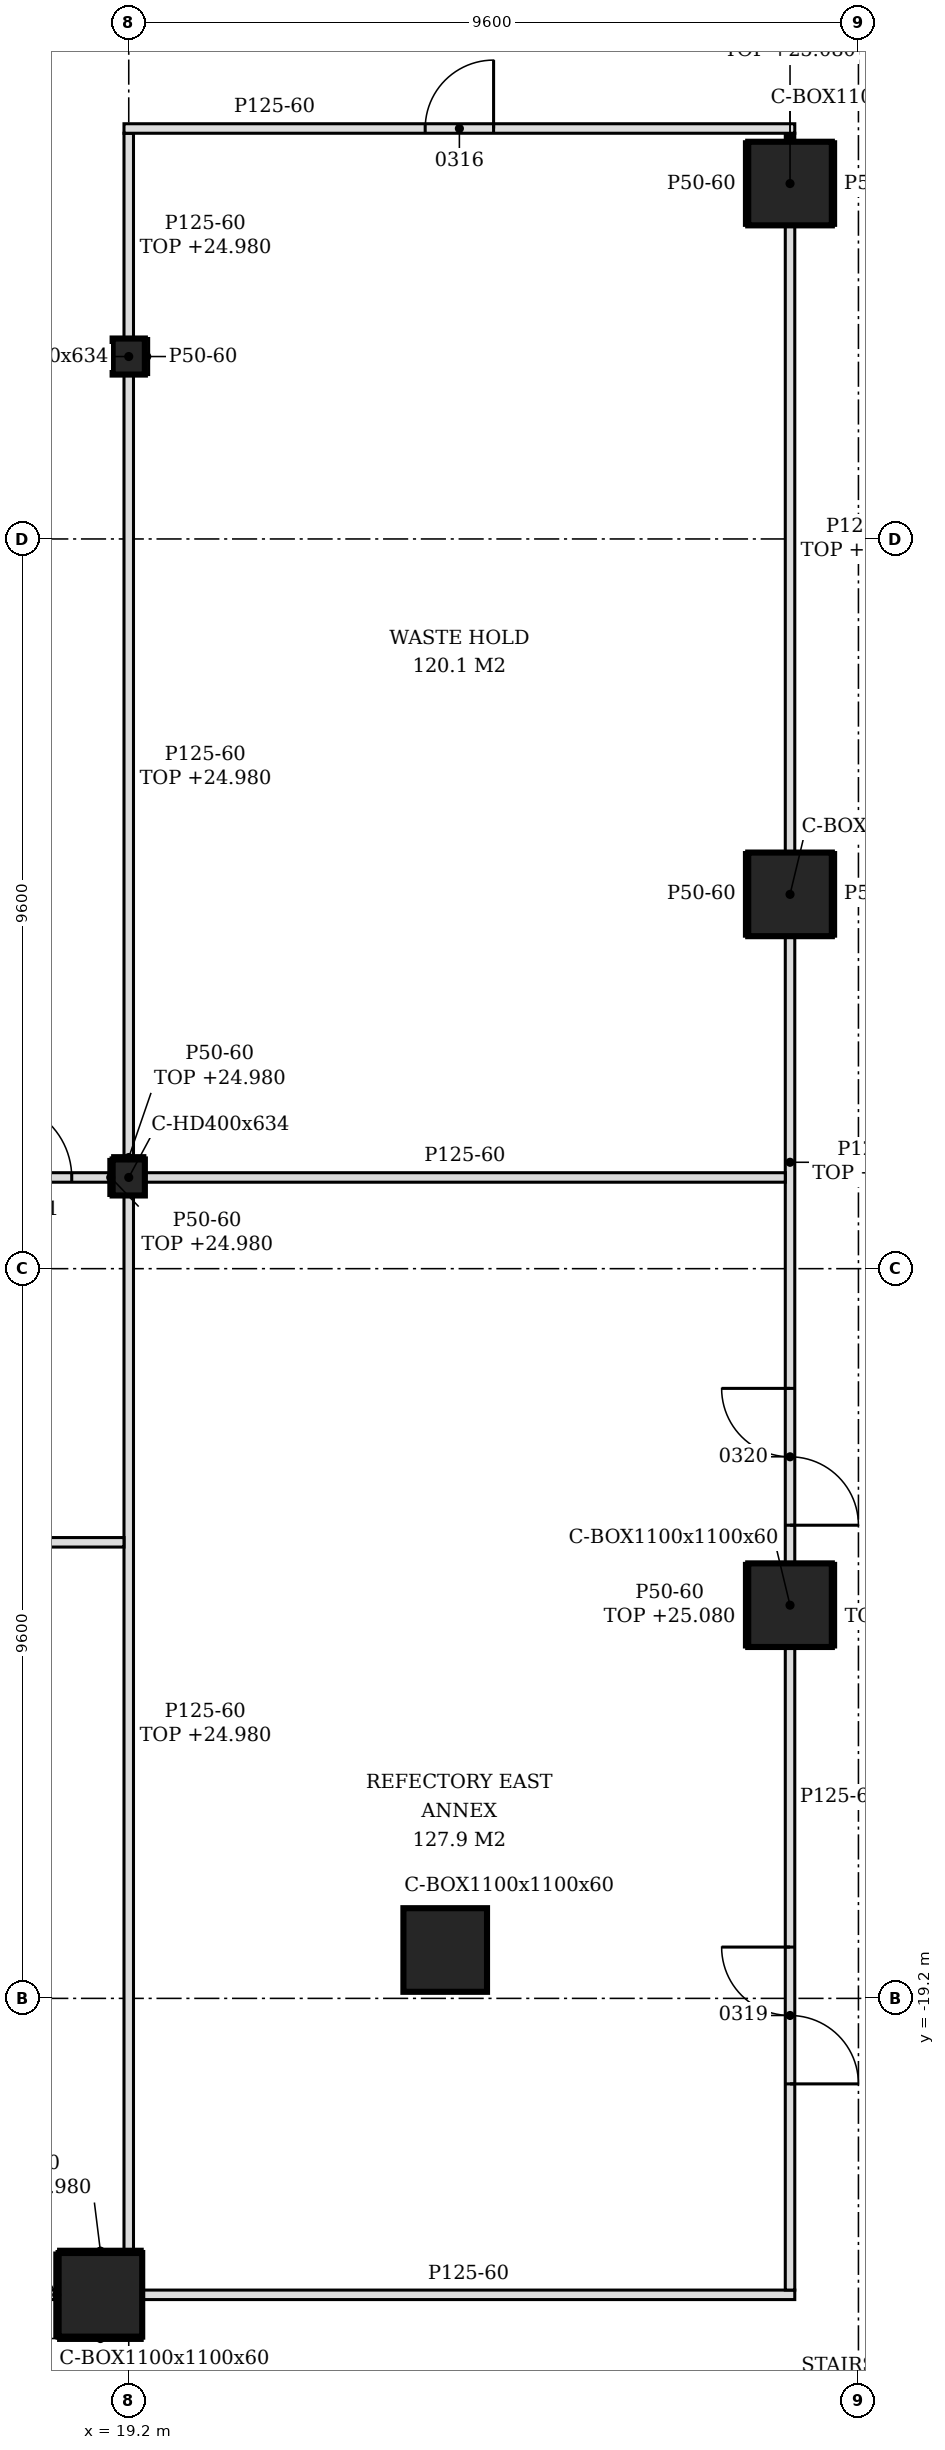
"""IFC4 building model, lengths in metres.
Left out: names, types, materials, properties, quantities, classifications, styles, units other than length and angle.
Written with IfcOpenShell. Run it as: python <this file> out.ifc"""

import sys

from ifc_helpers import new_model, si_unit, direction, frame, frame_2d, origin, origin_2d, place, context, subcontext, project, spatial, polyline, rectangle, hollow_rectangle, i_section, outline, extrude, element, fill, save


model = new_model("IFC4")
c1 = context("Model", 3, precision=1e-05, world=origin(), true_north=direction((0.0, 1.0)))
c2 = subcontext(c1, "Body", "Model", "MODEL_VIEW")
j1 = project(units=[si_unit("LENGTHUNIT", "METRE"), si_unit("PLANEANGLEUNIT", "RADIAN")], contexts=[c1])
p1 = place(None, origin())
s1 = spatial("IfcSite", under=j1, at=p1, CompositionType="ELEMENT")
p2 = place(p1, origin())
s2 = spatial("IfcBuilding", under=s1, at=p2, CompositionType="ELEMENT")
p3 = place(p2, frame((0.0, 0.0, 21.0)))
s3 = spatial("IfcBuildingStorey", under=s2, at=p3, CompositionType="ELEMENT", Elevation=21.0)
for number, where, z_axis, x_axis in (
    (1, (18.827, -23.1, -0.2), (0.0, 0.0, 1.0), (1.0, 0.0, 0.0)),
    (2, (23.364, -18.564, -0.2), (0.0, 0.0, 1.0), (1.0, 0.0, 0.0)),
    (3, (27.9, -14.027, -0.2), (0.0, 0.0, 1.0), (1.0, 0.0, 0.0)),
    (4, (27.9, -4.676, -0.2), (0.0, 0.0, 1.0), (1.0, 0.0, 0.0)),
    (5, (27.9, 4.676, -0.2), (0.0, 0.0, 1.0), (1.0, 0.0, 0.0)),
):
    element("IfcColumn", number, at=place(p3, frame(where, z_axis=z_axis, x_axis=x_axis)), inside=s3, PredefinedType="COLUMN", context=c2, shape_type="SweptSolid", body=[
        extrude(hollow_rectangle(XDim=1.1, YDim=1.1, WallThickness=0.06, at=origin_2d()), origin(), (0.0, 0.0, 1.0), 4.8),
    ])
for number, where, z_axis, x_axis in (
    (6, (19.2, -8.4, -0.2), (0.0, 0.0, 1.0), (1.0, 0.0, 0.0)),
    (7, (19.2, 2.4, -0.2), (0.0, 0.0, 1.0), (1.0, 0.0, 0.0)),
):
    element("IfcColumn", number, at=place(p3, frame(where, z_axis=z_axis, x_axis=x_axis)), inside=s3, PredefinedType="COLUMN", context=c2, shape_type="SweptSolid", body=[
        extrude(i_section(OverallWidth=0.424, OverallDepth=0.474, WebThickness=0.048, FlangeThickness=0.077, FilletRadius=0.015, at=origin_2d()), origin(), (0.0, 0.0, 1.0), 4.8),
    ])
p4 = place(p3, frame((9.964, -23.1, 0.0), z_axis=(0.0, 0.0, 1.0), x_axis=(1.0, 0.0, 0.0)))
e8 = element("IfcWall", 8, at=p4, inside=s3, PredefinedType="PARTITIONING", context=c2, shape_type="SweptSolid", body=[
    extrude(rectangle(XDim=8.313, YDim=0.125, at=frame_2d((4.157, 0.0))), origin(), (0.0, 0.0, 1.0), 4.08),
])
p5 = place(p4, frame((3.986, 0.0, 0.0)))
e9 = element("IfcOpeningElement", 9, at=p5, cuts=e8, PredefinedType="OPENING", context=c2, shape_type="SweptSolid", body=[
    extrude(rectangle(XDim=0.9, YDim=2.1, at=frame_2d((0.45, 1.05))), frame((0.0, 0.073, 0.0), z_axis=(0.0, -1.0, 0.0), x_axis=(1.0, 0.0, 0.0)), (0.0, 0.0, 1.0), 0.145),
])
p6 = place(p3, frame((19.377, -23.1, 0.0), z_axis=(0.0, 0.0, 1.0), x_axis=(1.0, 0.0, 0.0)))
e10 = element("IfcWall", 10, at=p6, inside=s3, PredefinedType="PARTITIONING", context=c2, shape_type="SweptSolid", body=[
    extrude(rectangle(XDim=8.585, YDim=0.125, at=frame_2d((4.292, 0.0))), origin(), (0.0, 0.0, 1.0), 4.6),
])
p7 = place(p3, frame((27.9, -23.038, 0.0), z_axis=(0.0, 0.0, 1.0), x_axis=(0.0, 1.0, 0.0)))
e11 = element("IfcWall", 11, at=p7, inside=s3, PredefinedType="PARTITIONING", context=c2, shape_type="SweptSolid", body=[
    extrude(outline(polyline([(0.0, 0.0), (8.46, 0.0), (8.46, 4.6), (3.927, 4.6), (3.926, 4.18), (3.748, 4.18), (3.746, 4.6), (0.0, 4.6), (0.0, 0.0)])), frame((0.0, 0.062, 0.0), z_axis=(0.0, -1.0, 0.0), x_axis=(1.0, 0.0, 0.0)), (0.0, 0.0, 1.0), 0.125),
])
p8 = place(p7, frame((2.712, 0.0, 0.0)))
e12 = element("IfcOpeningElement", 12, at=p8, cuts=e11, PredefinedType="OPENING", context=c2, shape_type="SweptSolid", body=[
    extrude(rectangle(XDim=1.8, YDim=2.1, at=frame_2d((0.9, 1.05))), frame((0.0, 0.073, 0.0), z_axis=(0.0, -1.0, 0.0), x_axis=(1.0, 0.0, 0.0)), (0.0, 0.0, 1.0), 0.145),
])
p9 = place(p3, frame((19.2, -22.55, 0.0), z_axis=(0.0, 0.0, 1.0), x_axis=(0.0, 1.0, 0.0)))
e13 = element("IfcWall", 13, at=p9, inside=s3, PredefinedType="PARTITIONING", context=c2, shape_type="SweptSolid", body=[
    extrude(rectangle(XDim=13.913, YDim=0.125, at=frame_2d((6.957, 0.0))), origin(), (0.0, 0.0, 1.0), 3.98),
])
p10 = place(p3, frame((27.9, -13.477, 0.0), z_axis=(0.0, 0.0, 1.0), x_axis=(0.0, 1.0, 0.0)))
e14 = element("IfcWall", 14, at=p10, inside=s3, PredefinedType="PARTITIONING", context=c2, shape_type="SweptSolid", body=[
    extrude(rectangle(XDim=8.252, YDim=0.125, at=frame_2d((4.126, 0.0))), origin(), (0.0, 0.0, 1.0), 4.08),
])
p11 = place(p10, frame((0.502, 0.0, 0.0)))
e15 = element("IfcOpeningElement", 15, at=p11, cuts=e14, PredefinedType="OPENING", context=c2, shape_type="SweptSolid", body=[
    extrude(rectangle(XDim=1.8, YDim=2.1, at=frame_2d((0.9, 1.05))), frame((0.0, 0.073, 0.0), z_axis=(0.0, -1.0, 0.0), x_axis=(1.0, 0.0, 0.0)), (0.0, 0.0, 1.0), 0.145),
])
p12 = place(p3, frame((-4.738, -13.2, 0.0), z_axis=(0.0, 0.0, 1.0), x_axis=(1.0, 0.0, 0.0)))
e16 = element("IfcWall", 16, at=p12, inside=s3, PredefinedType="PARTITIONING", context=c2, shape_type="SweptSolid", body=[
    extrude(outline(polyline([(0.0, 0.0), (23.875, 0.0), (23.875, 3.98), (23.788, 3.98), (23.785, 4.6), (19.288, 4.6), (19.285, 3.98), (18.988, 3.98), (18.986, 4.6), (14.488, 4.6), (14.486, 3.98), (14.188, 3.98), (14.186, 4.6), (9.688, 4.6), (9.686, 3.98), (9.387, 3.98), (9.385, 4.6), (4.887, 4.6), (4.885, 3.98), (4.587, 3.98), (4.585, 4.6), (0.087, 4.6), (0.085, 3.98), (0.0, 3.98), (0.0, 0.0)])), frame((0.0, 0.062, 0.0), z_axis=(0.0, -1.0, 0.0), x_axis=(1.0, 0.0, 0.0)), (0.0, 0.0, 1.0), 0.125),
])
p13 = place(p3, frame((7.412, -8.4, 0.0), z_axis=(0.0, 0.0, 1.0), x_axis=(1.0, 0.0, 0.0)))
e17 = element("IfcWall", 17, at=p13, inside=s3, PredefinedType="PARTITIONING", context=c2, shape_type="SweptSolid", body=[
    extrude(rectangle(XDim=11.576, YDim=0.125, at=frame_2d((5.788, 0.0))), origin(), (0.0, 0.0, 1.0), 3.98),
])
p14 = place(p13, frame((4.138, 0.0, 0.0)))
e18 = element("IfcOpeningElement", 18, at=p14, cuts=e17, PredefinedType="OPENING", context=c2, shape_type="SweptSolid", body=[
    extrude(rectangle(XDim=0.8, YDim=2.1, at=frame_2d((0.4, 1.05))), frame((0.0, 0.073, 0.0), z_axis=(0.0, -1.0, 0.0), x_axis=(1.0, 0.0, 0.0)), (0.0, 0.0, 1.0), 0.145),
])
p15 = place(p13, frame((10.038, 0.0, 0.0)))
e19 = element("IfcOpeningElement", 19, at=p15, cuts=e17, PredefinedType="OPENING", context=c2, shape_type="SweptSolid", body=[
    extrude(rectangle(XDim=1.0, YDim=2.1, at=frame_2d((0.5, 1.05))), frame((0.0, 0.073, 0.0), z_axis=(0.0, -1.0, 0.0), x_axis=(1.0, 0.0, 0.0)), (0.0, 0.0, 1.0), 0.145),
])
p16 = place(p3, frame((19.412, -8.4, 0.0), z_axis=(0.0, 0.0, 1.0), x_axis=(1.0, 0.0, 0.0)))
e20 = element("IfcWall", 20, at=p16, inside=s3, PredefinedType="PARTITIONING", context=c2, shape_type="SweptSolid", body=[
    extrude(outline(polyline([(0.0, 0.0), (8.425, 0.0), (8.426, 4.08), (8.338, 4.08), (8.336, 4.6), (0.0, 4.6), (0.0, 0.0)])), frame((0.0, 0.062, 0.0), z_axis=(0.0, -1.0, 0.0), x_axis=(1.0, 0.0, 0.0)), (0.0, 0.0, 1.0), 0.125),
])
p17 = place(p3, frame((19.2, -8.163, 0.0), z_axis=(0.0, 0.0, 1.0), x_axis=(0.0, 1.0, 0.0)))
e21 = element("IfcWall", 21, at=p17, inside=s3, PredefinedType="PARTITIONING", context=c2, shape_type="SweptSolid", body=[
    extrude(rectangle(XDim=10.326, YDim=0.125, at=frame_2d((5.163, 0.0))), origin(), (0.0, 0.0, 1.0), 3.98),
])
p18 = place(p3, frame((27.9, -4.126, 0.0), z_axis=(0.0, 0.0, 1.0), x_axis=(0.0, 1.0, 0.0)))
e22 = element("IfcWall", 22, at=p18, inside=s3, PredefinedType="PARTITIONING", context=c2, shape_type="SweptSolid", body=[
    extrude(rectangle(XDim=8.251, YDim=0.125, at=frame_2d((4.126, 0.0))), origin(), (0.0, 0.0, 1.0), 4.08),
])
p19 = place(p3, frame((19.2, 2.637, 0.0), z_axis=(0.0, 0.0, 1.0), x_axis=(0.0, 1.0, 0.0)))
e23 = element("IfcWall", 23, at=p19, inside=s3, PredefinedType="PARTITIONING", context=c2, shape_type="SweptSolid", body=[
    extrude(rectangle(XDim=2.7, YDim=0.125, at=frame_2d((1.35, 0.0))), origin(), (0.0, 0.0, 1.0), 3.98),
])
p20 = place(p3, frame((27.9, 5.226, 0.0), z_axis=(0.0, 0.0, 1.0), x_axis=(0.0, 1.0, 0.0)))
e24 = element("IfcWall", 24, at=p20, inside=s3, PredefinedType="PARTITIONING", context=c2, shape_type="SweptSolid", body=[
    extrude(rectangle(XDim=0.112, YDim=0.125, at=frame_2d((0.056, 0.0))), origin(), (0.0, 0.0, 1.0), 4.08),
])
p21 = place(p3, frame((19.137, 5.4, 0.0), z_axis=(0.0, 0.0, 1.0), x_axis=(1.0, 0.0, 0.0)))
e25 = element("IfcWall", 25, at=p21, inside=s3, PredefinedType="PARTITIONING", context=c2, shape_type="SweptSolid", body=[
    extrude(outline(polyline([(0.0, 0.0), (8.825, 0.0), (8.825, 4.08), (8.613, 4.08), (8.611, 4.6), (4.962, 4.6), (4.96, 4.08), (4.762, 4.08), (4.76, 4.6), (0.212, 4.6), (0.21, 3.98), (0.0, 3.98), (0.0, 0.0)])), frame((0.0, 0.062, 0.0), z_axis=(0.0, -1.0, 0.0), x_axis=(1.0, 0.0, 0.0)), (0.0, 0.0, 1.0), 0.125),
])
p22 = place(p21, frame((3.962, 0.0, 0.0)))
e26 = element("IfcOpeningElement", 26, at=p22, cuts=e25, PredefinedType="OPENING", context=c2, shape_type="SweptSolid", body=[
    extrude(rectangle(XDim=0.9, YDim=2.1, at=frame_2d((0.45, 1.05))), frame((0.0, 0.073, 0.0), z_axis=(0.0, -1.0, 0.0), x_axis=(1.0, 0.0, 0.0)), (0.0, 0.0, 1.0), 0.145),
])
p23 = place(p3, frame((18.277, -22.525, 0.0), z_axis=(0.0, 0.0, 1.0), x_axis=(1.0, 0.0, 0.0)))
e27 = element("IfcWall", 27, at=p23, inside=s3, PredefinedType="PARTITIONING", context=c2, shape_type="SweptSolid", body=[
    extrude(rectangle(XDim=1.1, YDim=0.05, at=frame_2d((0.55, 0.0))), origin(), (0.0, 0.0, 1.0), 3.98),
])
p24 = place(p3, frame((18.277, -23.675, 0.0), z_axis=(0.0, 0.0, 1.0), x_axis=(1.0, 0.0, 0.0)))
e28 = element("IfcWall", 28, at=p24, inside=s3, PredefinedType="PARTITIONING", context=c2, shape_type="SweptSolid", body=[
    extrude(rectangle(XDim=1.1, YDim=0.05, at=frame_2d((0.55, 0.0))), origin(), (0.0, 0.0, 1.0), 4.22),
])
p25 = place(p3, frame((18.252, -23.65, 0.0), z_axis=(0.0, 0.0, 1.0), x_axis=(0.0, 1.0, 0.0)))
e29 = element("IfcWall", 29, at=p25, inside=s3, PredefinedType="PARTITIONING", context=c2, shape_type="SweptSolid", body=[
    extrude(rectangle(XDim=1.1, YDim=0.05, at=frame_2d((0.55, 0.0))), origin(), (0.0, 0.0, 1.0), 4.08),
])
p26 = place(p3, frame((18.963, -8.637, 0.0), z_axis=(0.0, 0.0, 1.0), x_axis=(0.0, 1.0, 0.0)))
e30 = element("IfcWall", 30, at=p26, inside=s3, PredefinedType="PARTITIONING", context=c2, shape_type="SweptSolid", body=[
    extrude(rectangle(XDim=0.474, YDim=0.05, at=frame_2d((0.237, 0.0))), origin(), (0.0, 0.0, 1.0), 3.98),
])
for number, where, z_axis, x_axis in (
    (31, (27.325, -14.577, 0.0), (0.0, 0.0, 1.0), (0.0, 1.0, 0.0)),
    (32, (28.475, -14.577, 0.0), (0.0, 0.0, 1.0), (0.0, 1.0, 0.0)),
):
    element("IfcWall", number, at=place(p3, frame(where, z_axis=z_axis, x_axis=x_axis)), inside=s3, PredefinedType="PARTITIONING", context=c2, shape_type="SweptSolid", body=[
        extrude(rectangle(XDim=1.1, YDim=0.05, at=frame_2d((0.55, 0.0))), origin(), (0.0, 0.0, 1.0), 4.08),
    ])
for number, where, z_axis, x_axis in (
    (33, (27.325, -5.226, 0.0), (0.0, 0.0, 1.0), (0.0, 1.0, 0.0)),
    (34, (28.475, -5.226, 0.0), (0.0, 0.0, 1.0), (0.0, 1.0, 0.0)),
    (35, (27.325, 4.126, 0.0), (0.0, 0.0, 1.0), (0.0, 1.0, 0.0)),
    (36, (28.475, 4.126, 0.0), (0.0, 0.0, 1.0), (0.0, 1.0, 0.0)),
):
    element("IfcWall", number, at=place(p3, frame(where, z_axis=z_axis, x_axis=x_axis)), inside=s3, PredefinedType="PARTITIONING", context=c2, shape_type="SweptSolid", body=[
        extrude(rectangle(XDim=1.1, YDim=0.05, at=frame_2d((0.55, 0.0))), origin(), (0.0, 0.0, 1.0), 4.6),
    ])
p27 = place(p3, frame((18.988, -8.138, 0.0), z_axis=(0.0, 0.0, 1.0), x_axis=(1.0, 0.0, 0.0)))
e37 = element("IfcWall", 37, at=p27, inside=s3, PredefinedType="PARTITIONING", context=c2, shape_type="SweptSolid", body=[
    extrude(rectangle(XDim=0.424, YDim=0.05, at=frame_2d((0.212, 0.0))), origin(), (0.0, 0.0, 1.0), 3.98),
])
p28 = place(p3, frame((19.437, 2.163, 0.0), z_axis=(0.0, 0.0, 1.0), x_axis=(0.0, 1.0, 0.0)))
e38 = element("IfcWall", 38, at=p28, inside=s3, PredefinedType="PARTITIONING", context=c2, shape_type="SweptSolid", body=[
    extrude(rectangle(XDim=0.474, YDim=0.05, at=frame_2d((0.237, 0.0))), origin(), (0.0, 0.0, 1.0), 4.6),
])
p29 = place(p15, origin())
e39 = element("IfcDoor", 39, at=p29, inside=s3, OperationType="SINGLE_SWING_LEFT", PredefinedType="DOOR", context=c2, shape_type="SweptSolid", body=[
    extrude(rectangle(XDim=1.0, YDim=2.1, at=frame_2d((0.5, 1.05))), frame((0.0, 0.025, 0.0), z_axis=(0.0, -1.0, 0.0), x_axis=(1.0, 0.0, 0.0)), (0.0, 0.0, 1.0), 0.05),
])
fill(e19, e39)
p30 = place(p22, origin())
e40 = element("IfcDoor", 40, at=p30, inside=s3, OperationType="SINGLE_SWING_RIGHT", PredefinedType="DOOR", context=c2, shape_type="SweptSolid", body=[
    extrude(rectangle(XDim=0.9, YDim=2.1, at=frame_2d((0.45, 1.05))), frame((0.0, 0.025, 0.0), z_axis=(0.0, -1.0, 0.0), x_axis=(1.0, 0.0, 0.0)), (0.0, 0.0, 1.0), 0.05),
])
fill(e26, e40)
p31 = place(p8, frame((1.8, 0.0, 0.0), z_axis=(0.0, 0.0, 1.0), x_axis=(-1.0, 0.0, 0.0)))
e41 = element("IfcDoor", 41, at=p31, inside=s3, OperationType="DOUBLE_DOOR_SINGLE_SWING", PredefinedType="DOOR", context=c2, shape_type="SweptSolid", body=[
    extrude(rectangle(XDim=1.8, YDim=2.1, at=frame_2d((0.9, 1.05))), frame((0.0, 0.025, 0.0), z_axis=(0.0, -1.0, 0.0), x_axis=(1.0, 0.0, 0.0)), (0.0, 0.0, 1.0), 0.05),
])
fill(e12, e41)
p32 = place(p11, frame((1.8, 0.0, 0.0), z_axis=(0.0, 0.0, 1.0), x_axis=(-1.0, 0.0, 0.0)))
e42 = element("IfcDoor", 42, at=p32, inside=s3, OperationType="DOUBLE_DOOR_SINGLE_SWING", PredefinedType="DOOR", context=c2, shape_type="SweptSolid", body=[
    extrude(rectangle(XDim=1.8, YDim=2.1, at=frame_2d((0.9, 1.05))), frame((0.0, 0.025, 0.0), z_axis=(0.0, -1.0, 0.0), x_axis=(1.0, 0.0, 0.0)), (0.0, 0.0, 1.0), 0.05),
])
fill(e15, e42)
save(model, sys.argv[1])
